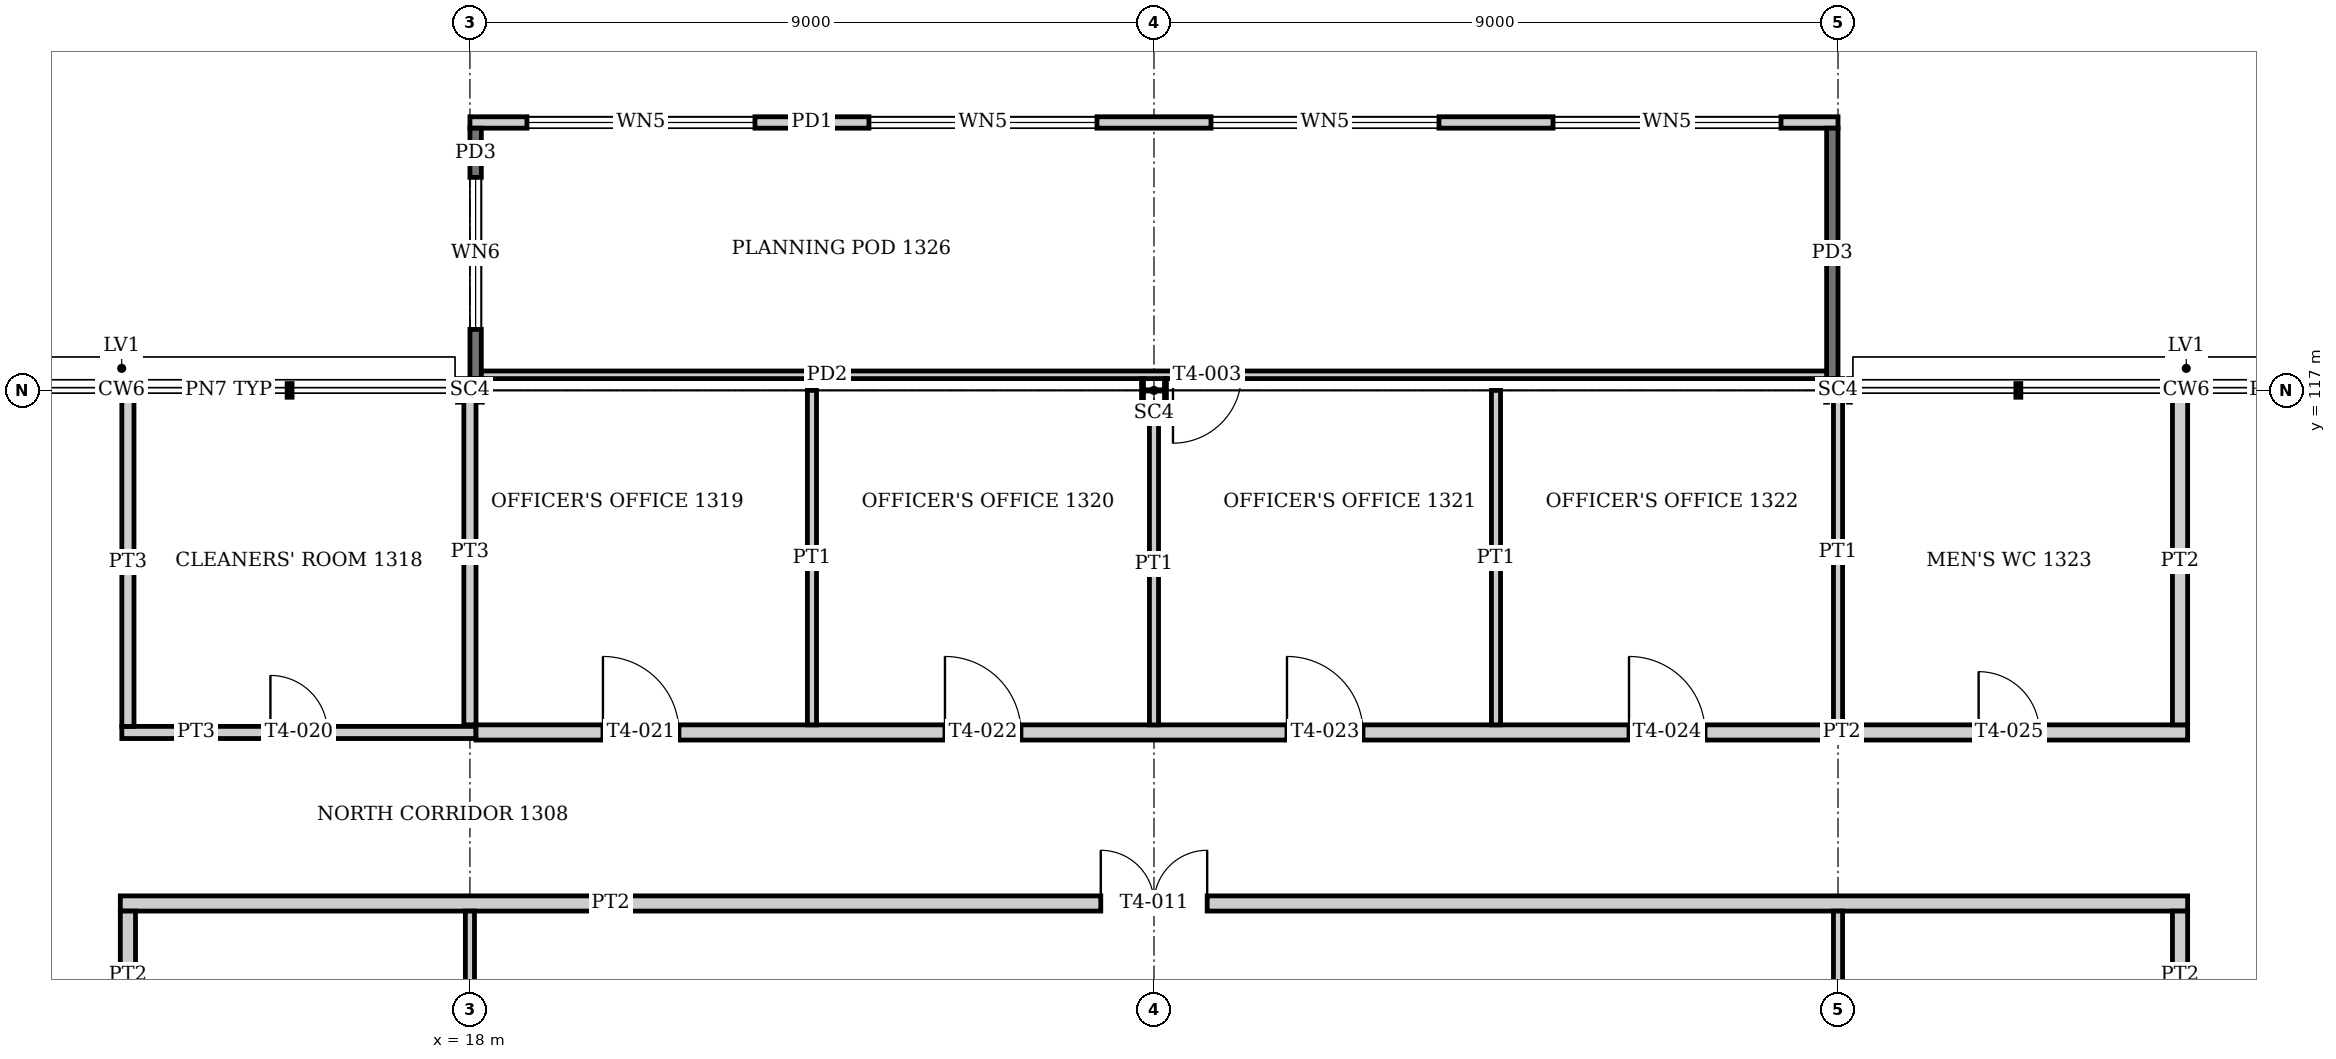
"""IFC4 building model, lengths in metres.
Left out: names, types, materials, properties, quantities, classifications, styles, units other than length and angle.
Written with IfcOpenShell. Run it as: python <this file> out.ifc"""

import sys

from ifc_helpers import new_model, si_unit, direction, frame, frame_2d, origin, origin_2d, place, context, subcontext, project, spatial, rectangle, i_section, extrude, element, fill, save


model = new_model("IFC4")
c1 = context("Model", 3, precision=1e-05, world=origin(), true_north=direction((0.0, 1.0)))
c2 = subcontext(c1, "Body", "Model", "MODEL_VIEW")
j1 = project(units=[si_unit("LENGTHUNIT", "METRE"), si_unit("PLANEANGLEUNIT", "RADIAN")], contexts=[c1])
p1 = place(None, origin())
s1 = spatial("IfcSite", under=j1, at=p1, CompositionType="ELEMENT")
p2 = place(p1, origin())
s2 = spatial("IfcBuilding", under=s1, at=p2, CompositionType="ELEMENT")
p3 = place(p2, frame((0.0, 0.0, 55.2)))
s3 = spatial("IfcBuildingStorey", under=s2, at=p3, CompositionType="ELEMENT", Elevation=55.2)
for number, where, z_axis, x_axis in (
    (1, (18.0, 117.0, 0.0), (0.0, 0.0, 1.0), (0.0, 1.0, 0.0)),
    (2, (27.0, 117.0, 0.0), (0.0, 0.0, 1.0), (0.0, 1.0, 0.0)),
    (3, (36.0, 117.0, 0.0), (0.0, 0.0, 1.0), (0.0, 1.0, 0.0)),
):
    element("IfcColumn", number, at=place(p3, frame(where, z_axis=z_axis, x_axis=x_axis)), inside=s3, PredefinedType="COLUMN", context=c2, shape_type="SweptSolid", body=[
        extrude(i_section(OverallWidth=0.311, OverallDepth=0.327, WebThickness=0.016, FlangeThickness=0.025, at=origin_2d()), origin(), (0.0, 0.0, 1.0), 4.0),
    ])
p4 = place(p3, frame((18.0, 120.525, 0.0), z_axis=(0.0, 0.0, 1.0), x_axis=(1.0, 0.0, 0.0)))
e4 = element("IfcWall", 4, at=p4, inside=s3, PredefinedType="SOLIDWALL", context=c2, shape_type="SweptSolid", body=[
    extrude(rectangle(XDim=18.0, YDim=0.15, at=frame_2d((9.0, 0.0))), origin(), (0.0, 0.0, 1.0), 2.6),
])
p5 = place(p4, frame((0.75, 0.0, 0.9)))
e5 = element("IfcOpeningElement", 5, at=p5, cuts=e4, PredefinedType="OPENING", context=c2, shape_type="SweptSolid", body=[
    extrude(rectangle(XDim=3.0, YDim=1.4, at=frame_2d((1.5, 0.7))), frame((0.0, 0.085, 0.0), z_axis=(0.0, -1.0, 0.0), x_axis=(1.0, 0.0, 0.0)), (0.0, 0.0, 1.0), 0.17),
])
p6 = place(p4, frame((5.25, 0.0, 0.9)))
e6 = element("IfcOpeningElement", 6, at=p6, cuts=e4, PredefinedType="OPENING", context=c2, shape_type="SweptSolid", body=[
    extrude(rectangle(XDim=3.0, YDim=1.4, at=frame_2d((1.5, 0.7))), frame((0.0, 0.085, 0.0), z_axis=(0.0, -1.0, 0.0), x_axis=(1.0, 0.0, 0.0)), (0.0, 0.0, 1.0), 0.17),
])
p7 = place(p4, frame((9.75, 0.0, 0.9)))
e7 = element("IfcOpeningElement", 7, at=p7, cuts=e4, PredefinedType="OPENING", context=c2, shape_type="SweptSolid", body=[
    extrude(rectangle(XDim=3.0, YDim=1.4, at=frame_2d((1.5, 0.7))), frame((0.0, 0.085, 0.0), z_axis=(0.0, -1.0, 0.0), x_axis=(1.0, 0.0, 0.0)), (0.0, 0.0, 1.0), 0.17),
])
p8 = place(p4, frame((14.25, 0.0, 0.9)))
e8 = element("IfcOpeningElement", 8, at=p8, cuts=e4, PredefinedType="OPENING", context=c2, shape_type="SweptSolid", body=[
    extrude(rectangle(XDim=3.0, YDim=1.4, at=frame_2d((1.5, 0.7))), frame((0.0, 0.085, 0.0), z_axis=(0.0, -1.0, 0.0), x_axis=(1.0, 0.0, 0.0)), (0.0, 0.0, 1.0), 0.17),
])
p9 = place(p3, frame((18.075, 120.45, -0.15), z_axis=(0.0, 0.0, 1.0), x_axis=(0.0, -1.0, 0.0)))
e9 = element("IfcWall", 9, at=p9, inside=s3, PredefinedType="SOLIDWALL", context=c2, shape_type="SweptSolid", body=[
    extrude(rectangle(XDim=3.294, YDim=0.15, at=frame_2d((1.647, 0.0))), origin(), (0.0, 0.0, 1.0), 2.75),
])
p10 = place(p9, frame((0.647, 0.0, 1.05)))
e10 = element("IfcOpeningElement", 10, at=p10, cuts=e9, PredefinedType="OPENING", context=c2, shape_type="SweptSolid", body=[
    extrude(rectangle(XDim=2.0, YDim=1.4, at=frame_2d((1.0, 0.7))), frame((0.0, 0.085, 0.0), z_axis=(0.0, -1.0, 0.0), x_axis=(1.0, 0.0, 0.0)), (0.0, 0.0, 1.0), 0.17),
])
p11 = place(p3, frame((35.925, 120.45, -0.15), z_axis=(0.0, 0.0, 1.0), x_axis=(0.0, -1.0, 0.0)))
e11 = element("IfcWall", 11, at=p11, inside=s3, PredefinedType="SOLIDWALL", context=c2, shape_type="SweptSolid", body=[
    extrude(rectangle(XDim=3.294, YDim=0.15, at=frame_2d((1.647, 0.0))), origin(), (0.0, 0.0, 1.0), 2.75),
])
p12 = place(p3, frame((18.15, 117.206, 0.0), z_axis=(0.0, 0.0, 1.0), x_axis=(1.0, 0.0, 0.0)))
e12 = element("IfcWall", 12, at=p12, inside=s3, PredefinedType="PARTITIONING", context=c2, shape_type="SweptSolid", body=[
    extrude(rectangle(XDim=17.7, YDim=0.1, at=frame_2d((8.85, 0.0))), origin(), (0.0, 0.0, 1.0), 2.6),
])
p13 = place(p12, frame((9.1, 0.0, 0.0)))
e13 = element("IfcOpeningElement", 13, at=p13, cuts=e12, PredefinedType="OPENING", context=c2, shape_type="SweptSolid", body=[
    extrude(rectangle(XDim=0.9, YDim=2.1, at=frame_2d((0.45, 1.05))), frame((0.0, 0.06, 0.0), z_axis=(0.0, -1.0, 0.0), x_axis=(1.0, 0.0, 0.0)), (0.0, 0.0, 1.0), 0.12),
])
p14 = place(p3, frame((13.4, 110.25, 0.0), z_axis=(0.0, 0.0, 1.0), x_axis=(1.0, 0.0, 0.0)))
e14 = element("IfcWall", 14, at=p14, inside=s3, PredefinedType="PARTITIONING", context=c2, shape_type="SweptSolid", body=[
    extrude(rectangle(XDim=27.2, YDim=0.2, at=frame_2d((13.6, 0.0))), origin(), (0.0, 0.0, 1.0), 3.05),
])
p15 = place(p14, frame((12.9, 0.0, 0.0)))
e15 = element("IfcOpeningElement", 15, at=p15, cuts=e14, PredefinedType="OPENING", context=c2, shape_type="SweptSolid", body=[
    extrude(rectangle(XDim=1.4, YDim=2.1, at=frame_2d((0.7, 1.05))), frame((0.0, 0.11, 0.0), z_axis=(0.0, -1.0, 0.0), x_axis=(1.0, 0.0, 0.0)), (0.0, 0.0, 1.0), 0.22),
])
p16 = place(p3, frame((13.42, 112.5, 0.0), z_axis=(0.0, 0.0, 1.0), x_axis=(1.0, 0.0, 0.0)))
e16 = element("IfcWall", 16, at=p16, inside=s3, PredefinedType="PARTITIONING", context=c2, shape_type="SweptSolid", body=[
    extrude(rectangle(XDim=4.66, YDim=0.16, at=frame_2d((2.33, 0.0))), origin(), (0.0, 0.0, 1.0), 3.05),
])
p17 = place(p16, frame((1.955, 0.0, 0.0)))
e17 = element("IfcOpeningElement", 17, at=p17, cuts=e16, PredefinedType="OPENING", context=c2, shape_type="SweptSolid", body=[
    extrude(rectangle(XDim=0.75, YDim=2.1, at=frame_2d((0.375, 1.05))), frame((0.0, 0.09, 0.0), z_axis=(0.0, -1.0, 0.0), x_axis=(1.0, 0.0, 0.0)), (0.0, 0.0, 1.0), 0.18),
])
p18 = place(p3, frame((18.08, 112.5, 0.0), z_axis=(0.0, 0.0, 1.0), x_axis=(1.0, 0.0, 0.0)))
e18 = element("IfcWall", 18, at=p18, inside=s3, PredefinedType="PARTITIONING", context=c2, shape_type="SweptSolid", body=[
    extrude(rectangle(XDim=22.52, YDim=0.2, at=frame_2d((11.26, 0.0))), origin(), (0.0, 0.0, 1.0), 3.05),
])
p19 = place(p18, frame((1.67, 0.0, 0.0)))
e19 = element("IfcOpeningElement", 19, at=p19, cuts=e18, PredefinedType="OPENING", context=c2, shape_type="SweptSolid", body=[
    extrude(rectangle(XDim=1.0, YDim=2.1, at=frame_2d((0.5, 1.05))), frame((0.0, 0.11, 0.0), z_axis=(0.0, -1.0, 0.0), x_axis=(1.0, 0.0, 0.0)), (0.0, 0.0, 1.0), 0.22),
])
p20 = place(p18, frame((6.17, 0.0, 0.0)))
e20 = element("IfcOpeningElement", 20, at=p20, cuts=e18, PredefinedType="OPENING", context=c2, shape_type="SweptSolid", body=[
    extrude(rectangle(XDim=1.0, YDim=2.1, at=frame_2d((0.5, 1.05))), frame((0.0, 0.11, 0.0), z_axis=(0.0, -1.0, 0.0), x_axis=(1.0, 0.0, 0.0)), (0.0, 0.0, 1.0), 0.22),
])
p21 = place(p18, frame((10.67, 0.0, 0.0)))
e21 = element("IfcOpeningElement", 21, at=p21, cuts=e18, PredefinedType="OPENING", context=c2, shape_type="SweptSolid", body=[
    extrude(rectangle(XDim=1.0, YDim=2.1, at=frame_2d((0.5, 1.05))), frame((0.0, 0.11, 0.0), z_axis=(0.0, -1.0, 0.0), x_axis=(1.0, 0.0, 0.0)), (0.0, 0.0, 1.0), 0.22),
])
p22 = place(p18, frame((15.17, 0.0, 0.0)))
e22 = element("IfcOpeningElement", 22, at=p22, cuts=e18, PredefinedType="OPENING", context=c2, shape_type="SweptSolid", body=[
    extrude(rectangle(XDim=1.0, YDim=2.1, at=frame_2d((0.5, 1.05))), frame((0.0, 0.11, 0.0), z_axis=(0.0, -1.0, 0.0), x_axis=(1.0, 0.0, 0.0)), (0.0, 0.0, 1.0), 0.22),
])
p23 = place(p18, frame((19.77, 0.0, 0.0)))
e23 = element("IfcOpeningElement", 23, at=p23, cuts=e18, PredefinedType="OPENING", context=c2, shape_type="SweptSolid", body=[
    extrude(rectangle(XDim=0.8, YDim=2.1, at=frame_2d((0.4, 1.05))), frame((0.0, 0.11, 0.0), z_axis=(0.0, -1.0, 0.0), x_axis=(1.0, 0.0, 0.0)), (0.0, 0.0, 1.0), 0.22),
])
p24 = place(p3, frame((13.5, 105.85, 0.0), z_axis=(0.0, 0.0, 1.0), x_axis=(0.0, 1.0, 0.0)))
e24 = element("IfcWall", 24, at=p24, inside=s3, PredefinedType="PARTITIONING", context=c2, shape_type="SweptSolid", body=[
    extrude(rectangle(XDim=4.3, YDim=0.2, at=frame_2d((2.15, 0.0))), origin(), (0.0, 0.0, 1.0), 3.05),
])
p25 = place(p24, frame((1.69, 0.0, 0.0)))
e25 = element("IfcOpeningElement", 25, at=p25, cuts=e24, PredefinedType="OPENING", context=c2, shape_type="SweptSolid", body=[
    extrude(rectangle(XDim=0.92, YDim=2.1, at=frame_2d((0.46, 1.05))), frame((0.0, 0.11, 0.0), z_axis=(0.0, -1.0, 0.0), x_axis=(1.0, 0.0, 0.0)), (0.0, 0.0, 1.0), 0.22),
])
p26 = place(p3, frame((13.5, 112.58, 0.0), z_axis=(0.0, 0.0, 1.0), x_axis=(0.0, 1.0, 0.0)))
e26 = element("IfcWall", 26, at=p26, inside=s3, PredefinedType="PARTITIONING", context=c2, shape_type="SweptSolid", body=[
    extrude(rectangle(XDim=4.33, YDim=0.16, at=frame_2d((2.165, 0.0))), origin(), (0.0, 0.0, 1.0), 3.05),
])
p27 = place(p3, frame((18.0, 105.85, 0.0), z_axis=(0.0, 0.0, 1.0), x_axis=(0.0, 1.0, 0.0)))
e27 = element("IfcWall", 27, at=p27, inside=s3, PredefinedType="PARTITIONING", context=c2, shape_type="SweptSolid", body=[
    extrude(rectangle(XDim=4.3, YDim=0.12, at=frame_2d((2.15, 0.0))), origin(), (0.0, 0.0, 1.0), 3.05),
])
p28 = place(p3, frame((18.0, 112.6, 0.0), z_axis=(0.0, 0.0, 1.0), x_axis=(0.0, 1.0, 0.0)))
e28 = element("IfcWall", 28, at=p28, inside=s3, PredefinedType="PARTITIONING", context=c2, shape_type="SweptSolid", body=[
    extrude(rectangle(XDim=4.555, YDim=0.16, at=frame_2d((2.278, 0.0))), origin(), (0.0, 0.0, 1.0), 3.05),
])
p29 = place(p3, frame((22.5, 112.6, 0.0), z_axis=(0.0, 0.0, 1.0), x_axis=(0.0, 1.0, 0.0)))
e29 = element("IfcWall", 29, at=p29, inside=s3, PredefinedType="PARTITIONING", context=c2, shape_type="SweptSolid", body=[
    extrude(rectangle(XDim=4.4, YDim=0.12, at=frame_2d((2.2, 0.0))), origin(), (0.0, 0.0, 1.0), 3.05),
])
p30 = place(p3, frame((27.0, 112.6, 0.0), z_axis=(0.0, 0.0, 1.0), x_axis=(0.0, 1.0, 0.0)))
e30 = element("IfcWall", 30, at=p30, inside=s3, PredefinedType="PARTITIONING", context=c2, shape_type="SweptSolid", body=[
    extrude(rectangle(XDim=4.236, YDim=0.12, at=frame_2d((2.118, 0.0))), origin(), (0.0, 0.0, 1.0), 3.05),
])
p31 = place(p3, frame((31.5, 112.6, 0.0), z_axis=(0.0, 0.0, 1.0), x_axis=(0.0, 1.0, 0.0)))
e31 = element("IfcWall", 31, at=p31, inside=s3, PredefinedType="PARTITIONING", context=c2, shape_type="SweptSolid", body=[
    extrude(rectangle(XDim=4.4, YDim=0.12, at=frame_2d((2.2, 0.0))), origin(), (0.0, 0.0, 1.0), 3.05),
])
p32 = place(p3, frame((36.0, 105.85, 0.0), z_axis=(0.0, 0.0, 1.0), x_axis=(0.0, 1.0, 0.0)))
e32 = element("IfcWall", 32, at=p32, inside=s3, PredefinedType="PARTITIONING", context=c2, shape_type="SweptSolid", body=[
    extrude(rectangle(XDim=4.3, YDim=0.12, at=frame_2d((2.15, 0.0))), origin(), (0.0, 0.0, 1.0), 3.05),
])
p33 = place(p3, frame((36.0, 112.6, 0.0), z_axis=(0.0, 0.0, 1.0), x_axis=(0.0, 1.0, 0.0)))
e33 = element("IfcWall", 33, at=p33, inside=s3, PredefinedType="PARTITIONING", context=c2, shape_type="SweptSolid", body=[
    extrude(rectangle(XDim=4.555, YDim=0.12, at=frame_2d((2.278, 0.0))), origin(), (0.0, 0.0, 1.0), 3.05),
])
p34 = place(p3, frame((40.5, 105.85, 0.0), z_axis=(0.0, 0.0, 1.0), x_axis=(0.0, 1.0, 0.0)))
e34 = element("IfcWall", 34, at=p34, inside=s3, PredefinedType="PARTITIONING", context=c2, shape_type="SweptSolid", body=[
    extrude(rectangle(XDim=4.3, YDim=0.2, at=frame_2d((2.15, 0.0))), origin(), (0.0, 0.0, 1.0), 3.05),
])
p35 = place(p34, frame((1.69, 0.0, 0.0)))
e35 = element("IfcOpeningElement", 35, at=p35, cuts=e34, PredefinedType="OPENING", context=c2, shape_type="SweptSolid", body=[
    extrude(rectangle(XDim=0.92, YDim=2.1, at=frame_2d((0.46, 1.05))), frame((0.0, 0.11, 0.0), z_axis=(0.0, -1.0, 0.0), x_axis=(1.0, 0.0, 0.0)), (0.0, 0.0, 1.0), 0.22),
])
p36 = place(p3, frame((40.5, 112.6, 0.0), z_axis=(0.0, 0.0, 1.0), x_axis=(0.0, 1.0, 0.0)))
e36 = element("IfcWall", 36, at=p36, inside=s3, PredefinedType="PARTITIONING", context=c2, shape_type="SweptSolid", body=[
    extrude(rectangle(XDim=4.31, YDim=0.2, at=frame_2d((2.155, 0.0))), origin(), (0.0, 0.0, 1.0), 3.05),
])
p37 = place(p5, origin())
e37 = element("IfcWindow", 37, at=p37, inside=s3, PartitioningType="SINGLE_PANEL", PredefinedType="WINDOW", context=c2, shape_type="SweptSolid", body=[
    extrude(rectangle(XDim=3.0, YDim=1.4, at=frame_2d((1.5, 0.7))), frame((0.0, 0.03, 0.0), z_axis=(0.0, -1.0, 0.0), x_axis=(1.0, 0.0, 0.0)), (0.0, 0.0, 1.0), 0.06),
])
fill(e5, e37)
p38 = place(p6, origin())
e38 = element("IfcWindow", 38, at=p38, inside=s3, PartitioningType="SINGLE_PANEL", PredefinedType="WINDOW", context=c2, shape_type="SweptSolid", body=[
    extrude(rectangle(XDim=3.0, YDim=1.4, at=frame_2d((1.5, 0.7))), frame((0.0, 0.03, 0.0), z_axis=(0.0, -1.0, 0.0), x_axis=(1.0, 0.0, 0.0)), (0.0, 0.0, 1.0), 0.06),
])
fill(e6, e38)
p39 = place(p7, origin())
e39 = element("IfcWindow", 39, at=p39, inside=s3, PartitioningType="SINGLE_PANEL", PredefinedType="WINDOW", context=c2, shape_type="SweptSolid", body=[
    extrude(rectangle(XDim=3.0, YDim=1.4, at=frame_2d((1.5, 0.7))), frame((0.0, 0.03, 0.0), z_axis=(0.0, -1.0, 0.0), x_axis=(1.0, 0.0, 0.0)), (0.0, 0.0, 1.0), 0.06),
])
fill(e7, e39)
p40 = place(p8, origin())
e40 = element("IfcWindow", 40, at=p40, inside=s3, PartitioningType="SINGLE_PANEL", PredefinedType="WINDOW", context=c2, shape_type="SweptSolid", body=[
    extrude(rectangle(XDim=3.0, YDim=1.4, at=frame_2d((1.5, 0.7))), frame((0.0, 0.03, 0.0), z_axis=(0.0, -1.0, 0.0), x_axis=(1.0, 0.0, 0.0)), (0.0, 0.0, 1.0), 0.06),
])
fill(e8, e40)
p41 = place(p10, origin())
e41 = element("IfcWindow", 41, at=p41, inside=s3, PartitioningType="SINGLE_PANEL", PredefinedType="WINDOW", context=c2, shape_type="SweptSolid", body=[
    extrude(rectangle(XDim=2.0, YDim=1.4, at=frame_2d((1.0, 0.7))), frame((0.0, 0.03, 0.0), z_axis=(0.0, -1.0, 0.0), x_axis=(1.0, 0.0, 0.0)), (0.0, 0.0, 1.0), 0.06),
])
fill(e10, e41)
p42 = place(p13, frame((0.9, 0.0, 0.0), z_axis=(0.0, 0.0, 1.0), x_axis=(-1.0, 0.0, 0.0)))
e42 = element("IfcDoor", 42, at=p42, inside=s3, OperationType="SINGLE_SWING_RIGHT", PredefinedType="DOOR", context=c2, shape_type="SweptSolid", body=[
    extrude(rectangle(XDim=0.9, YDim=2.1, at=frame_2d((0.45, 1.05))), frame((0.0, 0.025, 0.0), z_axis=(0.0, -1.0, 0.0), x_axis=(1.0, 0.0, 0.0)), (0.0, 0.0, 1.0), 0.05),
])
fill(e13, e42)
p43 = place(p15, origin())
e43 = element("IfcDoor", 43, at=p43, inside=s3, OperationType="DOUBLE_DOOR_SINGLE_SWING", PredefinedType="DOOR", context=c2, shape_type="SweptSolid", body=[
    extrude(rectangle(XDim=1.4, YDim=2.1, at=frame_2d((0.7, 1.05))), frame((0.0, 0.025, 0.0), z_axis=(0.0, -1.0, 0.0), x_axis=(1.0, 0.0, 0.0)), (0.0, 0.0, 1.0), 0.05),
])
fill(e15, e43)
p44 = place(p17, origin())
e44 = element("IfcDoor", 44, at=p44, inside=s3, OperationType="SINGLE_SWING_LEFT", PredefinedType="DOOR", context=c2, shape_type="SweptSolid", body=[
    extrude(rectangle(XDim=0.75, YDim=2.1, at=frame_2d((0.375, 1.05))), frame((0.0, 0.025, 0.0), z_axis=(0.0, -1.0, 0.0), x_axis=(1.0, 0.0, 0.0)), (0.0, 0.0, 1.0), 0.05),
])
fill(e17, e44)
p45 = place(p19, origin())
e45 = element("IfcDoor", 45, at=p45, inside=s3, OperationType="SINGLE_SWING_LEFT", PredefinedType="DOOR", context=c2, shape_type="SweptSolid", body=[
    extrude(rectangle(XDim=1.0, YDim=2.1, at=frame_2d((0.5, 1.05))), frame((0.0, 0.025, 0.0), z_axis=(0.0, -1.0, 0.0), x_axis=(1.0, 0.0, 0.0)), (0.0, 0.0, 1.0), 0.05),
])
fill(e19, e45)
p46 = place(p20, origin())
e46 = element("IfcDoor", 46, at=p46, inside=s3, OperationType="SINGLE_SWING_LEFT", PredefinedType="DOOR", context=c2, shape_type="SweptSolid", body=[
    extrude(rectangle(XDim=1.0, YDim=2.1, at=frame_2d((0.5, 1.05))), frame((0.0, 0.025, 0.0), z_axis=(0.0, -1.0, 0.0), x_axis=(1.0, 0.0, 0.0)), (0.0, 0.0, 1.0), 0.05),
])
fill(e20, e46)
p47 = place(p21, origin())
e47 = element("IfcDoor", 47, at=p47, inside=s3, OperationType="SINGLE_SWING_LEFT", PredefinedType="DOOR", context=c2, shape_type="SweptSolid", body=[
    extrude(rectangle(XDim=1.0, YDim=2.1, at=frame_2d((0.5, 1.05))), frame((0.0, 0.025, 0.0), z_axis=(0.0, -1.0, 0.0), x_axis=(1.0, 0.0, 0.0)), (0.0, 0.0, 1.0), 0.05),
])
fill(e21, e47)
p48 = place(p22, origin())
e48 = element("IfcDoor", 48, at=p48, inside=s3, OperationType="SINGLE_SWING_LEFT", PredefinedType="DOOR", context=c2, shape_type="SweptSolid", body=[
    extrude(rectangle(XDim=1.0, YDim=2.1, at=frame_2d((0.5, 1.05))), frame((0.0, 0.025, 0.0), z_axis=(0.0, -1.0, 0.0), x_axis=(1.0, 0.0, 0.0)), (0.0, 0.0, 1.0), 0.05),
])
fill(e22, e48)
p49 = place(p23, origin())
e49 = element("IfcDoor", 49, at=p49, inside=s3, OperationType="SINGLE_SWING_LEFT", PredefinedType="DOOR", context=c2, shape_type="SweptSolid", body=[
    extrude(rectangle(XDim=0.8, YDim=2.1, at=frame_2d((0.4, 1.05))), frame((0.0, 0.025, 0.0), z_axis=(0.0, -1.0, 0.0), x_axis=(1.0, 0.0, 0.0)), (0.0, 0.0, 1.0), 0.05),
])
fill(e23, e49)
save(model, sys.argv[1])
